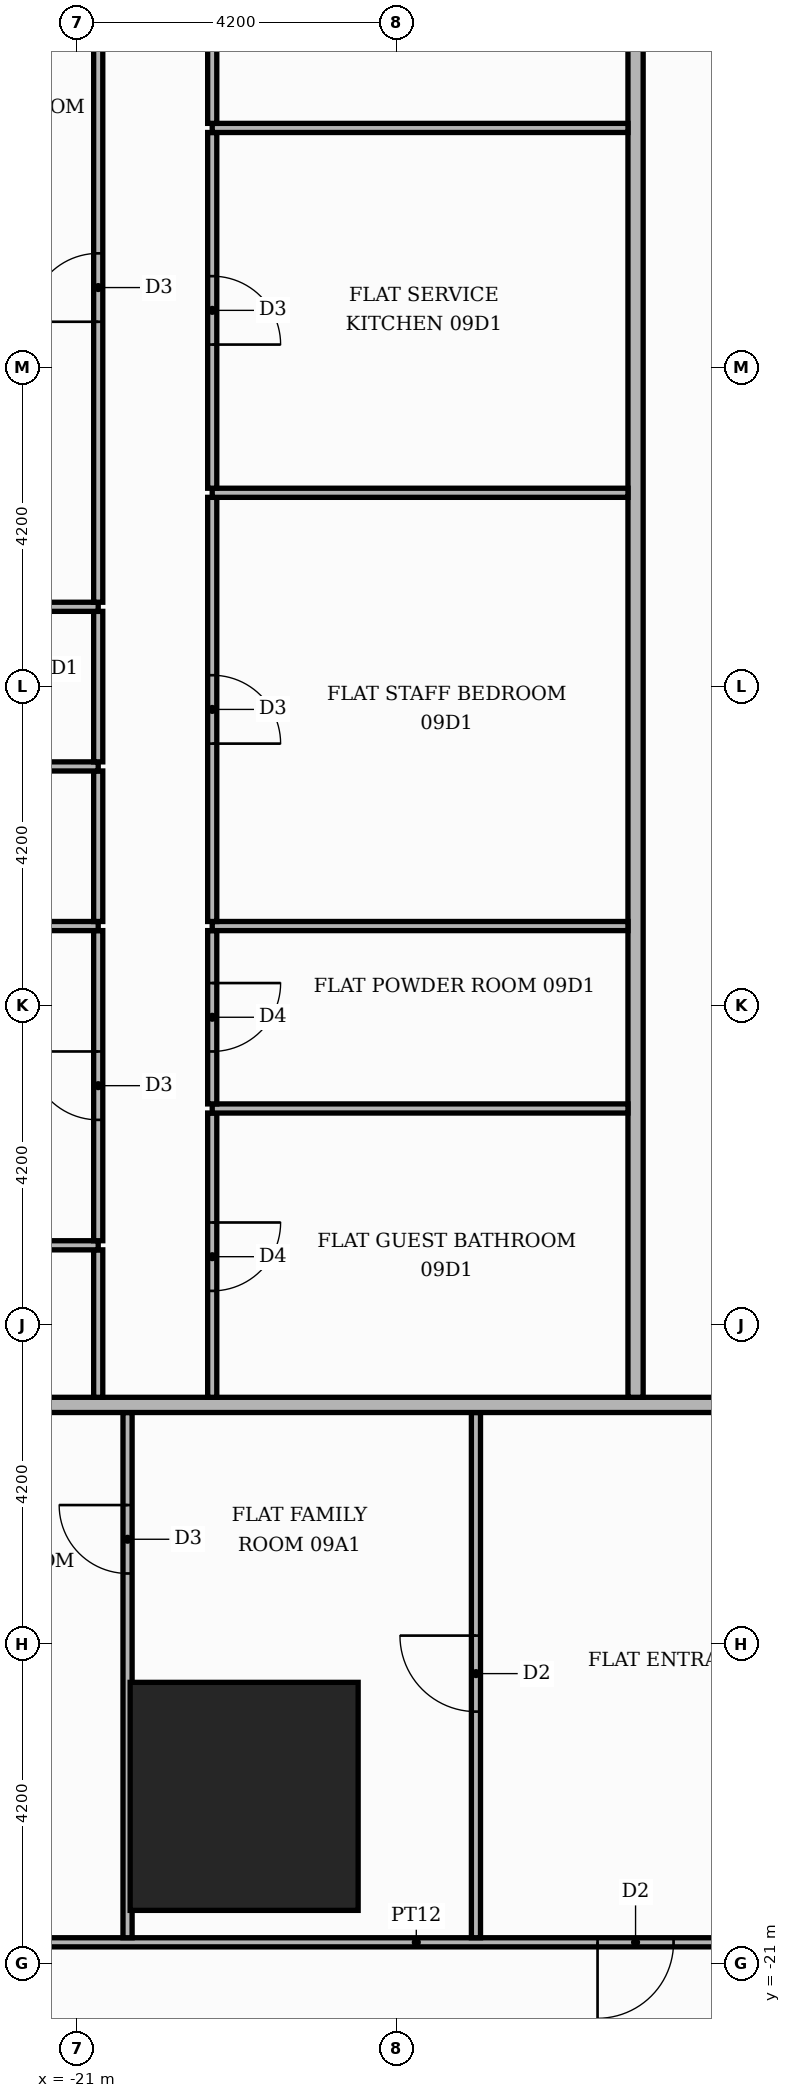
"""IFC4 building model, lengths in metres.
Left out: names, types, materials, properties, quantities, classifications, styles, units other than length and angle.
Written with IfcOpenShell. Run it as: python <this file> out.ifc"""

import sys

from ifc_helpers import new_model, si_unit, direction, frame, frame_2d, origin, origin_2d, place, context, subcontext, project, spatial, rectangle, extrude, element, fill, save


model = new_model("IFC4")
c1 = context("Model", 3, precision=1e-05, world=origin(), true_north=direction((0.0, 1.0)))
c2 = subcontext(c1, "Body", "Model", "MODEL_VIEW")
j1 = project(units=[si_unit("LENGTHUNIT", "METRE"), si_unit("PLANEANGLEUNIT", "RADIAN")], contexts=[c1])
p1 = place(None, origin())
s1 = spatial("IfcSite", under=j1, at=p1, CompositionType="ELEMENT")
p2 = place(p1, origin())
s2 = spatial("IfcBuilding", under=s1, at=p2, CompositionType="ELEMENT")
p3 = place(p2, frame((0.0, 0.0, 42.6)))
s3 = spatial("IfcBuildingStorey", under=s2, at=p3, CompositionType="ELEMENT", Elevation=42.6)
p4 = place(p3, frame((-18.8, -18.8, 0.0), z_axis=(0.0, 0.0, 1.0), x_axis=(1.0, 0.0, 0.0)))
e1 = element("IfcColumn", 1, at=p4, inside=s3, PredefinedType="COLUMN", context=c2, shape_type="SweptSolid", body=[
    extrude(rectangle(XDim=3.0, YDim=3.0, at=origin_2d()), origin(), (0.0, 0.0, 1.0), 3.9),
])
p5 = place(p3, frame((-25.42, -20.72, 0.0), z_axis=(0.0, 0.0, 1.0), x_axis=(1.0, 0.0, 0.0)))
e2 = element("IfcWall", 2, at=p5, inside=s3, PredefinedType="PARTITIONING", context=c2, shape_type="SweptSolid", body=[
    extrude(rectangle(XDim=17.77, YDim=0.12, at=frame_2d((8.885, 0.0))), origin(), (0.0, 0.0, 1.0), 3.48),
])
p6 = place(p5, frame((11.27, 0.0, 0.0)))
e3 = element("IfcOpeningElement", 3, at=p6, cuts=e2, PredefinedType="OPENING", context=c2, shape_type="SweptSolid", body=[
    extrude(rectangle(XDim=1.0, YDim=2.1, at=frame_2d((0.5, 1.05))), frame((0.0, 0.07, 0.0), z_axis=(0.0, -1.0, 0.0), x_axis=(1.0, 0.0, 0.0)), (0.0, 0.0, 1.0), 0.14),
])
p7 = place(p5, frame((15.47, 0.0, 0.0)))
e4 = element("IfcOpeningElement", 4, at=p7, cuts=e2, PredefinedType="OPENING", context=c2, shape_type="SweptSolid", body=[
    extrude(rectangle(XDim=1.0, YDim=2.1, at=frame_2d((0.5, 1.05))), frame((0.0, 0.07, 0.0), z_axis=(0.0, -1.0, 0.0), x_axis=(1.0, 0.0, 0.0)), (0.0, 0.0, 1.0), 0.14),
])
p8 = place(p3, frame((-20.334, -20.66, 0.0), z_axis=(0.0, 0.0, 1.0), x_axis=(0.0, 1.0, 0.0)))
e5 = element("IfcWall", 5, at=p8, inside=s3, PredefinedType="PARTITIONING", context=c2, shape_type="SweptSolid", body=[
    extrude(rectangle(XDim=6.91, YDim=0.12, at=frame_2d((3.455, 0.0))), origin(), (0.0, 0.0, 1.0), 3.48),
])
p9 = place(p8, frame((4.792, 0.0, 0.0)))
e6 = element("IfcOpeningElement", 6, at=p9, cuts=e5, PredefinedType="OPENING", context=c2, shape_type="SweptSolid", body=[
    extrude(rectangle(XDim=0.9, YDim=2.1, at=frame_2d((0.45, 1.05))), frame((0.0, 0.07, 0.0), z_axis=(0.0, -1.0, 0.0), x_axis=(1.0, 0.0, 0.0)), (0.0, 0.0, 1.0), 0.14),
])
p10 = place(p3, frame((-15.75, -20.66, 0.0), z_axis=(0.0, 0.0, 1.0), x_axis=(0.0, 1.0, 0.0)))
e7 = element("IfcWall", 7, at=p10, inside=s3, PredefinedType="PARTITIONING", context=c2, shape_type="SweptSolid", body=[
    extrude(rectangle(XDim=6.91, YDim=0.12, at=frame_2d((3.455, 0.0))), origin(), (0.0, 0.0, 1.0), 3.48),
])
p11 = place(p10, frame((2.975, 0.0, 0.0)))
e8 = element("IfcOpeningElement", 8, at=p11, cuts=e7, PredefinedType="OPENING", context=c2, shape_type="SweptSolid", body=[
    extrude(rectangle(XDim=1.0, YDim=2.1, at=frame_2d((0.5, 1.05))), frame((0.0, 0.07, 0.0), z_axis=(0.0, -1.0, 0.0), x_axis=(1.0, 0.0, 0.0)), (0.0, 0.0, 1.0), 0.14),
])
p12 = place(p3, frame((-25.42, -13.65, 0.0), z_axis=(0.0, 0.0, 1.0), x_axis=(1.0, 0.0, 0.0)))
e9 = element("IfcWall", 9, at=p12, inside=s3, PredefinedType="PARTITIONING", context=c2, shape_type="SweptSolid", body=[
    extrude(rectangle(XDim=39.07, YDim=0.2, at=frame_2d((19.535, 0.0))), origin(), (0.0, 0.0, 1.0), 3.48),
])
p13 = place(p12, frame((13.32, 0.0, 0.0)))
e10 = element("IfcOpeningElement", 10, at=p13, cuts=e9, PredefinedType="OPENING", context=c2, shape_type="SweptSolid", body=[
    extrude(rectangle(XDim=1.1, YDim=2.4, at=frame_2d((0.55, 1.2))), frame((0.0, 0.11, 0.0), z_axis=(0.0, -1.0, 0.0), x_axis=(1.0, 0.0, 0.0)), (0.0, 0.0, 1.0), 0.22),
])
p14 = place(p12, frame((21.72, 0.0, 0.0)))
e11 = element("IfcOpeningElement", 11, at=p14, cuts=e9, PredefinedType="OPENING", context=c2, shape_type="SweptSolid", body=[
    extrude(rectangle(XDim=1.1, YDim=2.4, at=frame_2d((0.55, 1.2))), frame((0.0, 0.11, 0.0), z_axis=(0.0, -1.0, 0.0), x_axis=(1.0, 0.0, 0.0)), (0.0, 0.0, 1.0), 0.22),
])
p15 = place(p3, frame((-20.72, -13.55, 0.0), z_axis=(0.0, 0.0, 1.0), x_axis=(0.0, 1.0, 0.0)))
e12 = element("IfcWall", 12, at=p15, inside=s3, PredefinedType="PARTITIONING", context=c2, shape_type="SweptSolid", body=[
    extrude(rectangle(XDim=1.94, YDim=0.12, at=frame_2d((0.97, 0.0))), origin(), (0.0, 0.0, 1.0), 3.48),
])
p16 = place(p3, frame((-19.22, -13.55, 0.0), z_axis=(0.0, 0.0, 1.0), x_axis=(0.0, 1.0, 0.0)))
e13 = element("IfcWall", 13, at=p16, inside=s3, PredefinedType="PARTITIONING", context=c2, shape_type="SweptSolid", body=[
    extrude(rectangle(XDim=3.74, YDim=0.12, at=frame_2d((1.87, 0.0))), origin(), (0.0, 0.0, 1.0), 3.48),
])
p17 = place(p16, frame((1.4, 0.0, 0.0)))
e14 = element("IfcOpeningElement", 14, at=p17, cuts=e13, PredefinedType="OPENING", context=c2, shape_type="SweptSolid", body=[
    extrude(rectangle(XDim=0.9, YDim=2.1, at=frame_2d((0.45, 1.05))), frame((0.0, 0.07, 0.0), z_axis=(0.0, -1.0, 0.0), x_axis=(1.0, 0.0, 0.0)), (0.0, 0.0, 1.0), 0.14),
])
p18 = place(p3, frame((-13.65, -13.55, 0.0), z_axis=(0.0, 0.0, 1.0), x_axis=(0.0, 1.0, 0.0)))
e15 = element("IfcWall", 15, at=p18, inside=s3, PredefinedType="PARTITIONING", context=c2, shape_type="SweptSolid", body=[
    extrude(rectangle(XDim=27.1, YDim=0.2, at=frame_2d((13.55, 0.0))), origin(), (0.0, 0.0, 1.0), 3.48),
])
p19 = place(p18, frame((24.55, 0.0, 0.0)))
e16 = element("IfcOpeningElement", 16, at=p19, cuts=e15, PredefinedType="OPENING", context=c2, shape_type="SweptSolid", body=[
    extrude(rectangle(XDim=1.1, YDim=2.4, at=frame_2d((0.55, 1.2))), frame((0.0, 0.11, 0.0), z_axis=(0.0, -1.0, 0.0), x_axis=(1.0, 0.0, 0.0)), (0.0, 0.0, 1.0), 0.22),
])
p20 = place(p3, frame((-25.42, -11.55, 0.0), z_axis=(0.0, 0.0, 1.0), x_axis=(1.0, 0.0, 0.0)))
e17 = element("IfcWall", 17, at=p20, inside=s3, PredefinedType="PARTITIONING", context=c2, shape_type="SweptSolid", body=[
    extrude(rectangle(XDim=4.7, YDim=0.12, at=frame_2d((2.35, 0.0))), origin(), (0.0, 0.0, 1.0), 3.48),
])
p21 = place(p20, frame((1.75, 0.0, 0.0)))
e18 = element("IfcOpeningElement", 18, at=p21, cuts=e17, PredefinedType="OPENING", context=c2, shape_type="SweptSolid", body=[
    extrude(rectangle(XDim=0.9, YDim=2.1, at=frame_2d((0.45, 1.05))), frame((0.0, 0.07, 0.0), z_axis=(0.0, -1.0, 0.0), x_axis=(1.0, 0.0, 0.0)), (0.0, 0.0, 1.0), 0.14),
])
p22 = place(p3, frame((-20.72, -11.49, 0.0), z_axis=(0.0, 0.0, 1.0), x_axis=(0.0, 1.0, 0.0)))
e19 = element("IfcWall", 19, at=p22, inside=s3, PredefinedType="PARTITIONING", context=c2, shape_type="SweptSolid", body=[
    extrude(rectangle(XDim=4.08, YDim=0.12, at=frame_2d((2.04, 0.0))), origin(), (0.0, 0.0, 1.0), 3.48),
])
p23 = place(p22, frame((1.59, 0.0, 0.0)))
e20 = element("IfcOpeningElement", 20, at=p23, cuts=e19, PredefinedType="OPENING", context=c2, shape_type="SweptSolid", body=[
    extrude(rectangle(XDim=0.9, YDim=2.1, at=frame_2d((0.45, 1.05))), frame((0.0, 0.07, 0.0), z_axis=(0.0, -1.0, 0.0), x_axis=(1.0, 0.0, 0.0)), (0.0, 0.0, 1.0), 0.14),
])
p24 = place(p3, frame((-19.22, -9.75, 0.0), z_axis=(0.0, 0.0, 1.0), x_axis=(1.0, 0.0, 0.0)))
e21 = element("IfcWall", 21, at=p24, inside=s3, PredefinedType="PARTITIONING", context=c2, shape_type="SweptSolid", body=[
    extrude(rectangle(XDim=5.47, YDim=0.12, at=frame_2d((2.735, 0.0))), origin(), (0.0, 0.0, 1.0), 3.48),
])
p25 = place(p3, frame((-19.22, -9.69, 0.0), z_axis=(0.0, 0.0, 1.0), x_axis=(0.0, 1.0, 0.0)))
e22 = element("IfcWall", 22, at=p25, inside=s3, PredefinedType="PARTITIONING", context=c2, shape_type="SweptSolid", body=[
    extrude(rectangle(XDim=2.28, YDim=0.12, at=frame_2d((1.14, 0.0))), origin(), (0.0, 0.0, 1.0), 3.48),
])
p26 = place(p25, frame((0.69, 0.0, 0.0)))
e23 = element("IfcOpeningElement", 23, at=p26, cuts=e22, PredefinedType="OPENING", context=c2, shape_type="SweptSolid", body=[
    extrude(rectangle(XDim=0.9, YDim=2.1, at=frame_2d((0.45, 1.05))), frame((0.0, 0.07, 0.0), z_axis=(0.0, -1.0, 0.0), x_axis=(1.0, 0.0, 0.0)), (0.0, 0.0, 1.0), 0.14),
])
p27 = place(p3, frame((-25.42, -7.35, 0.0), z_axis=(0.0, 0.0, 1.0), x_axis=(1.0, 0.0, 0.0)))
e24 = element("IfcWall", 24, at=p27, inside=s3, PredefinedType="PARTITIONING", context=c2, shape_type="SweptSolid", body=[
    extrude(rectangle(XDim=4.7, YDim=0.12, at=frame_2d((2.35, 0.0))), origin(), (0.0, 0.0, 1.0), 3.48),
])
p28 = place(p3, frame((-19.22, -7.35, 0.0), z_axis=(0.0, 0.0, 1.0), x_axis=(1.0, 0.0, 0.0)))
e25 = element("IfcWall", 25, at=p28, inside=s3, PredefinedType="PARTITIONING", context=c2, shape_type="SweptSolid", body=[
    extrude(rectangle(XDim=5.47, YDim=0.12, at=frame_2d((2.735, 0.0))), origin(), (0.0, 0.0, 1.0), 3.48),
])
p29 = place(p3, frame((-20.72, -7.29, 0.0), z_axis=(0.0, 0.0, 1.0), x_axis=(0.0, 1.0, 0.0)))
e26 = element("IfcWall", 26, at=p29, inside=s3, PredefinedType="PARTITIONING", context=c2, shape_type="SweptSolid", body=[
    extrude(rectangle(XDim=1.98, YDim=0.12, at=frame_2d((0.99, 0.0))), origin(), (0.0, 0.0, 1.0), 3.48),
])
p30 = place(p3, frame((-19.22, -7.29, 0.0), z_axis=(0.0, 0.0, 1.0), x_axis=(0.0, 1.0, 0.0)))
e27 = element("IfcWall", 27, at=p30, inside=s3, PredefinedType="PARTITIONING", context=c2, shape_type="SweptSolid", body=[
    extrude(rectangle(XDim=5.58, YDim=0.12, at=frame_2d((2.79, 0.0))), origin(), (0.0, 0.0, 1.0), 3.48),
])
p31 = place(p30, frame((2.34, 0.0, 0.0)))
e28 = element("IfcOpeningElement", 28, at=p31, cuts=e27, PredefinedType="OPENING", context=c2, shape_type="SweptSolid", body=[
    extrude(rectangle(XDim=0.9, YDim=2.1, at=frame_2d((0.45, 1.05))), frame((0.0, 0.07, 0.0), z_axis=(0.0, -1.0, 0.0), x_axis=(1.0, 0.0, 0.0)), (0.0, 0.0, 1.0), 0.14),
])
p32 = place(p3, frame((-25.42, -5.25, 0.0), z_axis=(0.0, 0.0, 1.0), x_axis=(1.0, 0.0, 0.0)))
e29 = element("IfcWall", 29, at=p32, inside=s3, PredefinedType="PARTITIONING", context=c2, shape_type="SweptSolid", body=[
    extrude(rectangle(XDim=4.7, YDim=0.12, at=frame_2d((2.35, 0.0))), origin(), (0.0, 0.0, 1.0), 3.48),
])
p33 = place(p32, frame((1.75, 0.0, 0.0)))
e30 = element("IfcOpeningElement", 30, at=p33, cuts=e29, PredefinedType="OPENING", context=c2, shape_type="SweptSolid", body=[
    extrude(rectangle(XDim=0.9, YDim=2.1, at=frame_2d((0.45, 1.05))), frame((0.0, 0.07, 0.0), z_axis=(0.0, -1.0, 0.0), x_axis=(1.0, 0.0, 0.0)), (0.0, 0.0, 1.0), 0.14),
])
p34 = place(p3, frame((-20.72, -5.19, 0.0), z_axis=(0.0, 0.0, 1.0), x_axis=(0.0, 1.0, 0.0)))
e31 = element("IfcWall", 31, at=p34, inside=s3, PredefinedType="PARTITIONING", context=c2, shape_type="SweptSolid", body=[
    extrude(rectangle(XDim=1.98, YDim=0.12, at=frame_2d((0.99, 0.0))), origin(), (0.0, 0.0, 1.0), 3.48),
])
p35 = place(p3, frame((-25.42, -3.15, 0.0), z_axis=(0.0, 0.0, 1.0), x_axis=(1.0, 0.0, 0.0)))
e32 = element("IfcWall", 32, at=p35, inside=s3, PredefinedType="PARTITIONING", context=c2, shape_type="SweptSolid", body=[
    extrude(rectangle(XDim=4.7, YDim=0.12, at=frame_2d((2.35, 0.0))), origin(), (0.0, 0.0, 1.0), 3.48),
])
p36 = place(p35, frame((1.75, 0.0, 0.0)))
e33 = element("IfcOpeningElement", 33, at=p36, cuts=e32, PredefinedType="OPENING", context=c2, shape_type="SweptSolid", body=[
    extrude(rectangle(XDim=0.9, YDim=2.1, at=frame_2d((0.45, 1.05))), frame((0.0, 0.07, 0.0), z_axis=(0.0, -1.0, 0.0), x_axis=(1.0, 0.0, 0.0)), (0.0, 0.0, 1.0), 0.14),
])
p37 = place(p3, frame((-20.72, -3.09, 0.0), z_axis=(0.0, 0.0, 1.0), x_axis=(0.0, 1.0, 0.0)))
e34 = element("IfcWall", 34, at=p37, inside=s3, PredefinedType="PARTITIONING", context=c2, shape_type="SweptSolid", body=[
    extrude(rectangle(XDim=8.28, YDim=0.12, at=frame_2d((4.14, 0.0))), origin(), (0.0, 0.0, 1.0), 3.48),
])
p38 = place(p37, frame((3.69, 0.0, 0.0)))
e35 = element("IfcOpeningElement", 35, at=p38, cuts=e34, PredefinedType="OPENING", context=c2, shape_type="SweptSolid", body=[
    extrude(rectangle(XDim=0.9, YDim=2.1, at=frame_2d((0.45, 1.05))), frame((0.0, 0.07, 0.0), z_axis=(0.0, -1.0, 0.0), x_axis=(1.0, 0.0, 0.0)), (0.0, 0.0, 1.0), 0.14),
])
p39 = place(p3, frame((-19.22, -1.65, 0.0), z_axis=(0.0, 0.0, 1.0), x_axis=(1.0, 0.0, 0.0)))
e36 = element("IfcWall", 36, at=p39, inside=s3, PredefinedType="PARTITIONING", context=c2, shape_type="SweptSolid", body=[
    extrude(rectangle(XDim=5.47, YDim=0.12, at=frame_2d((2.735, 0.0))), origin(), (0.0, 0.0, 1.0), 3.48),
])
p40 = place(p3, frame((-19.22, -1.59, 0.0), z_axis=(0.0, 0.0, 1.0), x_axis=(0.0, 1.0, 0.0)))
e37 = element("IfcWall", 37, at=p40, inside=s3, PredefinedType="PARTITIONING", context=c2, shape_type="SweptSolid", body=[
    extrude(rectangle(XDim=4.68, YDim=0.12, at=frame_2d((2.34, 0.0))), origin(), (0.0, 0.0, 1.0), 3.48),
])
p41 = place(p40, frame((1.89, 0.0, 0.0)))
e38 = element("IfcOpeningElement", 38, at=p41, cuts=e37, PredefinedType="OPENING", context=c2, shape_type="SweptSolid", body=[
    extrude(rectangle(XDim=0.9, YDim=2.1, at=frame_2d((0.45, 1.05))), frame((0.0, 0.07, 0.0), z_axis=(0.0, -1.0, 0.0), x_axis=(1.0, 0.0, 0.0)), (0.0, 0.0, 1.0), 0.14),
])
p42 = place(p3, frame((-19.22, 3.15, 0.0), z_axis=(0.0, 0.0, 1.0), x_axis=(1.0, 0.0, 0.0)))
e39 = element("IfcWall", 39, at=p42, inside=s3, PredefinedType="PARTITIONING", context=c2, shape_type="SweptSolid", body=[
    extrude(rectangle(XDim=5.47, YDim=0.12, at=frame_2d((2.735, 0.0))), origin(), (0.0, 0.0, 1.0), 3.48),
])
p43 = place(p3, frame((-19.22, 3.21, 0.0), z_axis=(0.0, 0.0, 1.0), x_axis=(0.0, 1.0, 0.0)))
e40 = element("IfcWall", 40, at=p43, inside=s3, PredefinedType="PARTITIONING", context=c2, shape_type="SweptSolid", body=[
    extrude(rectangle(XDim=6.18, YDim=0.12, at=frame_2d((3.09, 0.0))), origin(), (0.0, 0.0, 1.0), 3.48),
])
p44 = place(p43, frame((2.64, 0.0, 0.0)))
e41 = element("IfcOpeningElement", 41, at=p44, cuts=e40, PredefinedType="OPENING", context=c2, shape_type="SweptSolid", body=[
    extrude(rectangle(XDim=0.9, YDim=2.1, at=frame_2d((0.45, 1.05))), frame((0.0, 0.07, 0.0), z_axis=(0.0, -1.0, 0.0), x_axis=(1.0, 0.0, 0.0)), (0.0, 0.0, 1.0), 0.14),
])
p45 = place(p9, origin())
e42 = element("IfcDoor", 42, at=p45, inside=s3, OperationType="SINGLE_SWING_RIGHT", PredefinedType="DOOR", context=c2, shape_type="SweptSolid", body=[
    extrude(rectangle(XDim=0.9, YDim=2.1, at=frame_2d((0.45, 1.05))), frame((0.0, 0.025, 0.0), z_axis=(0.0, -1.0, 0.0), x_axis=(1.0, 0.0, 0.0)), (0.0, 0.0, 1.0), 0.05),
])
fill(e6, e42)
p46 = place(p11, origin())
e43 = element("IfcDoor", 43, at=p46, inside=s3, OperationType="SINGLE_SWING_RIGHT", PredefinedType="DOOR", context=c2, shape_type="SweptSolid", body=[
    extrude(rectangle(XDim=1.0, YDim=2.1, at=frame_2d((0.5, 1.05))), frame((0.0, 0.025, 0.0), z_axis=(0.0, -1.0, 0.0), x_axis=(1.0, 0.0, 0.0)), (0.0, 0.0, 1.0), 0.05),
])
fill(e8, e43)
p47 = place(p6, frame((1.0, 0.0, 0.0), z_axis=(0.0, 0.0, 1.0), x_axis=(-1.0, 0.0, 0.0)))
e44 = element("IfcDoor", 44, at=p47, inside=s3, OperationType="SINGLE_SWING_LEFT", PredefinedType="DOOR", context=c2, shape_type="SweptSolid", body=[
    extrude(rectangle(XDim=1.0, YDim=2.1, at=frame_2d((0.5, 1.05))), frame((0.0, 0.025, 0.0), z_axis=(0.0, -1.0, 0.0), x_axis=(1.0, 0.0, 0.0)), (0.0, 0.0, 1.0), 0.05),
])
fill(e3, e44)
p48 = place(p41, frame((0.9, 0.0, 0.0), z_axis=(0.0, 0.0, 1.0), x_axis=(-1.0, 0.0, 0.0)))
e45 = element("IfcDoor", 45, at=p48, inside=s3, OperationType="SINGLE_SWING_LEFT", PredefinedType="DOOR", context=c2, shape_type="SweptSolid", body=[
    extrude(rectangle(XDim=0.9, YDim=2.1, at=frame_2d((0.45, 1.05))), frame((0.0, 0.025, 0.0), z_axis=(0.0, -1.0, 0.0), x_axis=(1.0, 0.0, 0.0)), (0.0, 0.0, 1.0), 0.05),
])
fill(e38, e45)
p49 = place(p31, frame((0.9, 0.0, 0.0), z_axis=(0.0, 0.0, 1.0), x_axis=(-1.0, 0.0, 0.0)))
e46 = element("IfcDoor", 46, at=p49, inside=s3, OperationType="SINGLE_SWING_LEFT", PredefinedType="DOOR", context=c2, shape_type="SweptSolid", body=[
    extrude(rectangle(XDim=0.9, YDim=2.1, at=frame_2d((0.45, 1.05))), frame((0.0, 0.025, 0.0), z_axis=(0.0, -1.0, 0.0), x_axis=(1.0, 0.0, 0.0)), (0.0, 0.0, 1.0), 0.05),
])
fill(e28, e46)
p50 = place(p26, frame((0.9, 0.0, 0.0), z_axis=(0.0, 0.0, 1.0), x_axis=(-1.0, 0.0, 0.0)))
e47 = element("IfcDoor", 47, at=p50, inside=s3, OperationType="SINGLE_SWING_RIGHT", PredefinedType="DOOR", context=c2, shape_type="SweptSolid", body=[
    extrude(rectangle(XDim=0.9, YDim=2.1, at=frame_2d((0.45, 1.05))), frame((0.0, 0.025, 0.0), z_axis=(0.0, -1.0, 0.0), x_axis=(1.0, 0.0, 0.0)), (0.0, 0.0, 1.0), 0.05),
])
fill(e23, e47)
p51 = place(p17, frame((0.9, 0.0, 0.0), z_axis=(0.0, 0.0, 1.0), x_axis=(-1.0, 0.0, 0.0)))
e48 = element("IfcDoor", 48, at=p51, inside=s3, OperationType="SINGLE_SWING_RIGHT", PredefinedType="DOOR", context=c2, shape_type="SweptSolid", body=[
    extrude(rectangle(XDim=0.9, YDim=2.1, at=frame_2d((0.45, 1.05))), frame((0.0, 0.025, 0.0), z_axis=(0.0, -1.0, 0.0), x_axis=(1.0, 0.0, 0.0)), (0.0, 0.0, 1.0), 0.05),
])
fill(e14, e48)
p52 = place(p38, origin())
e49 = element("IfcDoor", 49, at=p52, inside=s3, OperationType="SINGLE_SWING_LEFT", PredefinedType="DOOR", context=c2, shape_type="SweptSolid", body=[
    extrude(rectangle(XDim=0.9, YDim=2.1, at=frame_2d((0.45, 1.05))), frame((0.0, 0.025, 0.0), z_axis=(0.0, -1.0, 0.0), x_axis=(1.0, 0.0, 0.0)), (0.0, 0.0, 1.0), 0.05),
])
fill(e35, e49)
p53 = place(p23, origin())
e50 = element("IfcDoor", 50, at=p53, inside=s3, OperationType="SINGLE_SWING_RIGHT", PredefinedType="DOOR", context=c2, shape_type="SweptSolid", body=[
    extrude(rectangle(XDim=0.9, YDim=2.1, at=frame_2d((0.45, 1.05))), frame((0.0, 0.025, 0.0), z_axis=(0.0, -1.0, 0.0), x_axis=(1.0, 0.0, 0.0)), (0.0, 0.0, 1.0), 0.05),
])
fill(e20, e50)
save(model, sys.argv[1])
